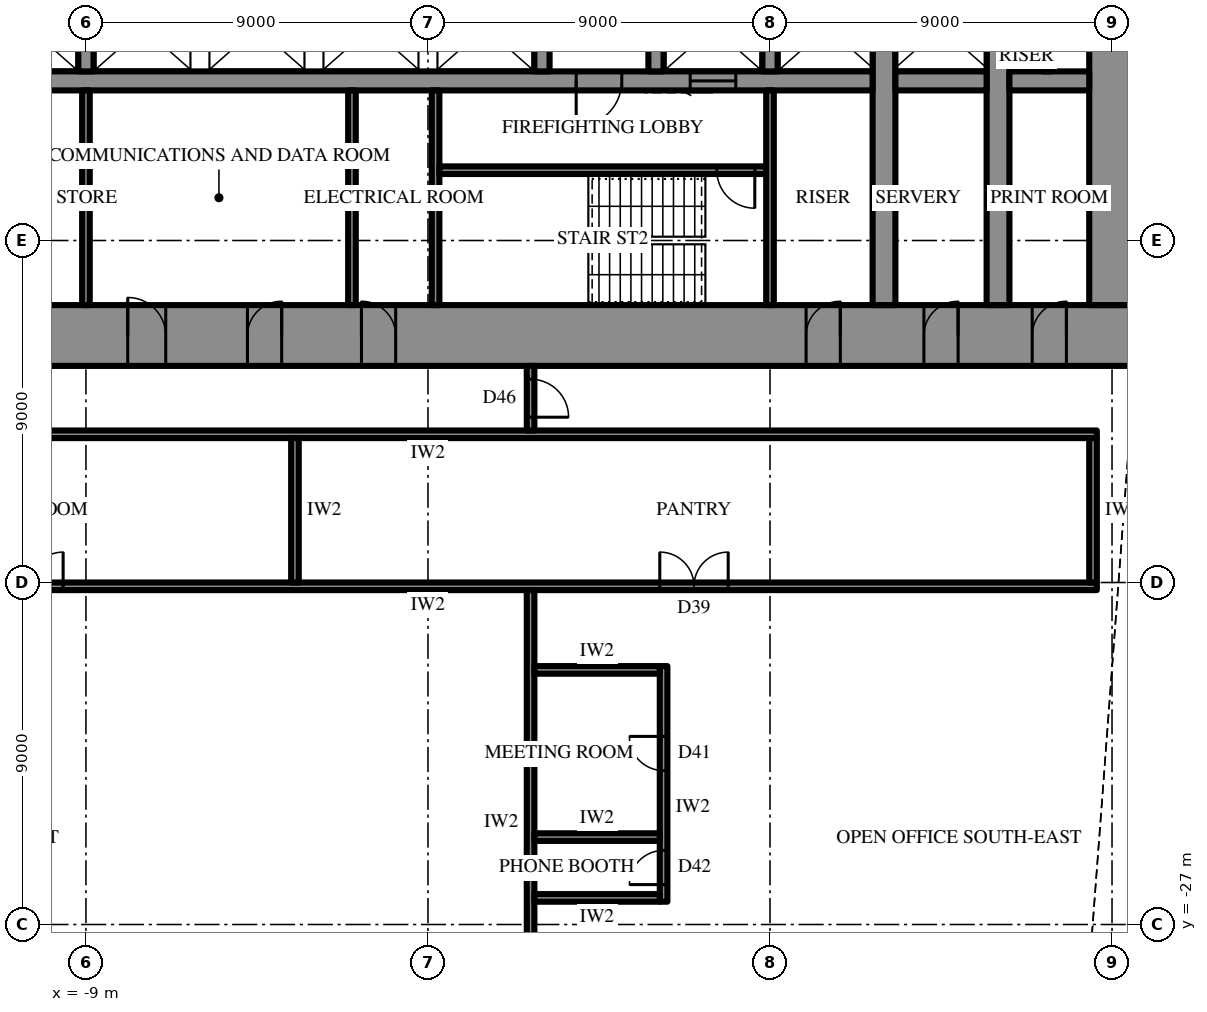
"""IFC4 building model, lengths in metres.
Left out: names, types, materials, properties, quantities, classifications, styles, units other than length and angle.
Written with IfcOpenShell. Run it as: python <this file> out.ifc"""

import sys

from ifc_helpers import new_model, si_unit, direction, frame, frame_2d, origin, place, context, subcontext, project, spatial, rectangle, extrude, element, fill, save


model = new_model("IFC4")
c1 = context("Model", 3, precision=1e-05, world=origin(), true_north=direction((0.0, 1.0)))
c2 = subcontext(c1, "Body", "Model", "MODEL_VIEW")
j1 = project(units=[si_unit("LENGTHUNIT", "METRE"), si_unit("PLANEANGLEUNIT", "RADIAN")], contexts=[c1])
p1 = place(None, origin())
s1 = spatial("IfcSite", under=j1, at=p1, CompositionType="ELEMENT")
p2 = place(p1, origin())
s2 = spatial("IfcBuilding", under=s1, at=p2, CompositionType="ELEMENT")
p3 = place(p2, frame((0.0, 0.0, 153.1)))
s3 = spatial("IfcBuildingStorey", under=s2, at=p3, CompositionType="ELEMENT", Elevation=153.1)
p4 = place(p3, frame((18.6, -11.5, 0.0), z_axis=(0.0, 0.0, 1.0), x_axis=(-1.0, 0.0, 0.0)))
e1 = element("IfcWall", 1, at=p4, inside=s3, PredefinedType="SHEAR", context=c2, shape_type="SweptSolid", body=[
    extrude(rectangle(XDim=37.2, YDim=1.6, at=frame_2d((18.6, 0.0))), origin(), (0.0, 0.0, 1.0), 4.2),
])
p5 = place(p4, frame((19.45, 0.0, 0.0)))
e2 = element("IfcOpeningElement", 2, at=p5, cuts=e1, PredefinedType="OPENING", context=c2, shape_type="SweptSolid", body=[
    extrude(rectangle(XDim=0.9, YDim=2.2, at=frame_2d((0.45, 1.1))), frame((0.0, 0.81, 0.0), z_axis=(0.0, -1.0, 0.0), x_axis=(1.0, 0.0, 0.0)), (0.0, 0.0, 1.0), 1.62),
])
p6 = place(p4, frame((22.45, 0.0, 0.0)))
e3 = element("IfcOpeningElement", 3, at=p6, cuts=e1, PredefinedType="OPENING", context=c2, shape_type="SweptSolid", body=[
    extrude(rectangle(XDim=0.9, YDim=2.2, at=frame_2d((0.45, 1.1))), frame((0.0, 0.81, 0.0), z_axis=(0.0, -1.0, 0.0), x_axis=(1.0, 0.0, 0.0)), (0.0, 0.0, 1.0), 1.62),
])
p7 = place(p4, frame((25.5, 0.0, 0.0)))
e4 = element("IfcOpeningElement", 4, at=p7, cuts=e1, PredefinedType="OPENING", context=c2, shape_type="SweptSolid", body=[
    extrude(rectangle(XDim=1.0, YDim=2.2, at=frame_2d((0.5, 1.1))), frame((0.0, 0.81, 0.0), z_axis=(0.0, -1.0, 0.0), x_axis=(1.0, 0.0, 0.0)), (0.0, 0.0, 1.0), 1.62),
])
p8 = place(p4, frame((1.8, 0.0, 0.0)))
e5 = element("IfcOpeningElement", 5, at=p8, cuts=e1, PredefinedType="OPENING", context=c2, shape_type="SweptSolid", body=[
    extrude(rectangle(XDim=0.9, YDim=2.2, at=frame_2d((0.45, 1.1))), frame((0.0, 0.81, 0.0), z_axis=(0.0, -1.0, 0.0), x_axis=(1.0, 0.0, 0.0)), (0.0, 0.0, 1.0), 1.62),
])
p9 = place(p4, frame((4.65, 0.0, 0.0)))
e6 = element("IfcOpeningElement", 6, at=p9, cuts=e1, PredefinedType="OPENING", context=c2, shape_type="SweptSolid", body=[
    extrude(rectangle(XDim=0.9, YDim=2.2, at=frame_2d((0.45, 1.1))), frame((0.0, 0.81, 0.0), z_axis=(0.0, -1.0, 0.0), x_axis=(1.0, 0.0, 0.0)), (0.0, 0.0, 1.0), 1.62),
])
p10 = place(p4, frame((7.75, 0.0, 0.0)))
e7 = element("IfcOpeningElement", 7, at=p10, cuts=e1, PredefinedType="OPENING", context=c2, shape_type="SweptSolid", body=[
    extrude(rectangle(XDim=0.9, YDim=2.2, at=frame_2d((0.45, 1.1))), frame((0.0, 0.81, 0.0), z_axis=(0.0, -1.0, 0.0), x_axis=(1.0, 0.0, 0.0)), (0.0, 0.0, 1.0), 1.62),
])
p11 = place(p4, frame((28.55, 0.0, 0.0)))
e8 = element("IfcOpeningElement", 8, at=p11, cuts=e1, PredefinedType="OPENING", context=c2, shape_type="SweptSolid", body=[
    extrude(rectangle(XDim=0.9, YDim=2.2, at=frame_2d((0.45, 1.1))), frame((0.0, 0.81, 0.0), z_axis=(0.0, -1.0, 0.0), x_axis=(1.0, 0.0, 0.0)), (0.0, 0.0, 1.0), 1.62),
])
p12 = place(p4, frame((31.65, 0.0, 0.0)))
e9 = element("IfcOpeningElement", 9, at=p12, cuts=e1, PredefinedType="OPENING", context=c2, shape_type="SweptSolid", body=[
    extrude(rectangle(XDim=0.9, YDim=2.2, at=frame_2d((0.45, 1.1))), frame((0.0, 0.81, 0.0), z_axis=(0.0, -1.0, 0.0), x_axis=(1.0, 0.0, 0.0)), (0.0, 0.0, 1.0), 1.62),
])
p13 = place(p4, frame((34.5, 0.0, 0.0)))
e10 = element("IfcOpeningElement", 10, at=p13, cuts=e1, PredefinedType="OPENING", context=c2, shape_type="SweptSolid", body=[
    extrude(rectangle(XDim=0.9, YDim=2.2, at=frame_2d((0.45, 1.1))), frame((0.0, 0.81, 0.0), z_axis=(0.0, -1.0, 0.0), x_axis=(1.0, 0.0, 0.0)), (0.0, 0.0, 1.0), 1.62),
])
p14 = place(p3, frame((18.0, -10.7, 0.0), z_axis=(0.0, 0.0, 1.0), x_axis=(0.0, 1.0, 0.0)))
e11 = element("IfcWall", 11, at=p14, inside=s3, PredefinedType="SHEAR", context=c2, shape_type="SweptSolid", body=[
    extrude(rectangle(XDim=21.4, YDim=1.2, at=frame_2d((10.7, 0.0))), origin(), (0.0, 0.0, 1.0), 4.2),
])
p15 = place(p14, frame((9.8, 0.0, 0.0)))
e12 = element("IfcOpeningElement", 12, at=p15, cuts=e11, PredefinedType="OPENING", context=c2, shape_type="SweptSolid", body=[
    extrude(rectangle(XDim=1.8, YDim=2.4, at=frame_2d((0.9, 1.2))), frame((0.0, 0.61, 0.0), z_axis=(0.0, -1.0, 0.0), x_axis=(1.0, 0.0, 0.0)), (0.0, 0.0, 1.0), 1.22),
])
p16 = place(p3, frame((12.0, -10.7, 0.0), z_axis=(0.0, 0.0, 1.0), x_axis=(0.0, 1.0, 0.0)))
e13 = element("IfcWall", 13, at=p16, inside=s3, PredefinedType="SHEAR", context=c2, shape_type="SweptSolid", body=[
    extrude(rectangle(XDim=21.4, YDim=0.6, at=frame_2d((10.7, 0.0))), origin(), (0.0, 0.0, 1.0), 4.2),
])
p17 = place(p16, frame((9.8, 0.0, 0.0)))
e14 = element("IfcOpeningElement", 14, at=p17, cuts=e13, PredefinedType="OPENING", context=c2, shape_type="SweptSolid", body=[
    extrude(rectangle(XDim=1.8, YDim=2.4, at=frame_2d((0.9, 1.2))), frame((0.0, 0.31, 0.0), z_axis=(0.0, -1.0, 0.0), x_axis=(1.0, 0.0, 0.0)), (0.0, 0.0, 1.0), 0.62),
])
p18 = place(p3, frame((15.0, -10.7, 0.0), z_axis=(0.0, 0.0, 1.0), x_axis=(0.0, 1.0, 0.0)))
e15 = element("IfcWall", 15, at=p18, inside=s3, PredefinedType="SHEAR", context=c2, shape_type="SweptSolid", body=[
    extrude(rectangle(XDim=21.4, YDim=0.6, at=frame_2d((10.7, 0.0))), origin(), (0.0, 0.0, 1.0), 4.2),
])
p19 = place(p18, frame((9.8, 0.0, 0.0)))
e16 = element("IfcOpeningElement", 16, at=p19, cuts=e15, PredefinedType="OPENING", context=c2, shape_type="SweptSolid", body=[
    extrude(rectangle(XDim=1.8, YDim=2.4, at=frame_2d((0.9, 1.2))), frame((0.0, 0.31, 0.0), z_axis=(0.0, -1.0, 0.0), x_axis=(1.0, 0.0, 0.0)), (0.0, 0.0, 1.0), 0.62),
])
p20 = place(p3, frame((17.4, -4.8, 0.0), z_axis=(0.0, 0.0, 1.0), x_axis=(-1.0, 0.0, 0.0)))
e17 = element("IfcWall", 17, at=p20, inside=s3, PredefinedType="SHEAR", context=c2, shape_type="SweptSolid", body=[
    extrude(rectangle(XDim=2.1, YDim=0.5, at=frame_2d((1.05, 0.0))), origin(), (0.0, 0.0, 1.0), 4.2),
])
p21 = place(p3, frame((14.7, -4.8, 0.0), z_axis=(0.0, 0.0, 1.0), x_axis=(-1.0, 0.0, 0.0)))
e18 = element("IfcWall", 18, at=p21, inside=s3, PredefinedType="SHEAR", context=c2, shape_type="SweptSolid", body=[
    extrude(rectangle(XDim=2.4, YDim=0.5, at=frame_2d((1.2, 0.0))), origin(), (0.0, 0.0, 1.0), 4.2),
])
p22 = place(p3, frame((11.7, -4.8, 0.0), z_axis=(0.0, 0.0, 1.0), x_axis=(-1.0, 0.0, 0.0)))
e19 = element("IfcWall", 19, at=p22, inside=s3, PredefinedType="SHEAR", context=c2, shape_type="SweptSolid", body=[
    extrude(rectangle(XDim=23.4, YDim=0.5, at=frame_2d((11.7, 0.0))), origin(), (0.0, 0.0, 1.0), 4.2),
])
p23 = place(p22, frame((6.6, 0.0, 0.0)))
e20 = element("IfcOpeningElement", 20, at=p23, cuts=e19, PredefinedType="OPENING", context=c2, shape_type="SweptSolid", body=[
    extrude(rectangle(XDim=1.2, YDim=2.2, at=frame_2d((0.6, 1.1))), frame((0.0, 0.26, 0.0), z_axis=(0.0, -1.0, 0.0), x_axis=(1.0, 0.0, 0.0)), (0.0, 0.0, 1.0), 0.52),
])
p24 = place(p22, frame((3.6, 0.0, 0.0)))
e21 = element("IfcOpeningElement", 21, at=p24, cuts=e19, PredefinedType="OPENING", context=c2, shape_type="SweptSolid", body=[
    extrude(rectangle(XDim=1.2, YDim=2.2, at=frame_2d((0.6, 1.1))), frame((0.0, 0.26, 0.0), z_axis=(0.0, -1.0, 0.0), x_axis=(1.0, 0.0, 0.0)), (0.0, 0.0, 1.0), 0.52),
])
for number, where, z_axis, x_axis in (
    (22, (9.0, -2.25, 0.0), (0.0, 0.0, 1.0), (0.0, -1.0, 0.0)),
    (23, (6.0, -2.25, 0.0), (0.0, 0.0, 1.0), (0.0, -1.0, 0.0)),
    (24, (3.0, -2.25, 0.0), (0.0, 0.0, 1.0), (0.0, -1.0, 0.0)),
    (25, (-9.0, -2.25, 0.0), (0.0, 0.0, 1.0), (0.0, -1.0, 0.0)),
):
    element("IfcWall", number, at=place(p3, frame(where, z_axis=z_axis, x_axis=x_axis)), inside=s3, PredefinedType="SHEAR", context=c2, shape_type="SweptSolid", body=[
        extrude(rectangle(XDim=2.3, YDim=0.4, at=frame_2d((1.15, 0.0))), origin(), (0.0, 0.0, 1.0), 4.2),
    ])
p25 = place(p3, frame((0.2, -5.05, 0.0), z_axis=(0.0, 0.0, 1.0), x_axis=(0.0, -1.0, 0.0)))
e26 = element("IfcWall", 26, at=p25, inside=s3, PredefinedType="SHEAR", context=c2, shape_type="SweptSolid", body=[
    extrude(rectangle(XDim=5.65, YDim=0.2, at=frame_2d((2.825, 0.0))), origin(), (0.0, 0.0, 1.0), 4.2),
])
p26 = place(p3, frame((8.9, -7.15, 0.0), z_axis=(0.0, 0.0, 1.0), x_axis=(-1.0, 0.0, 0.0)))
e27 = element("IfcWall", 27, at=p26, inside=s3, PredefinedType="SHEAR", context=c2, shape_type="SweptSolid", body=[
    extrude(rectangle(XDim=8.6, YDim=0.2, at=frame_2d((4.3, 0.0))), origin(), (0.0, 0.0, 1.0), 4.2),
])
p27 = place(p26, frame((0.3, 0.0, 0.0)))
e28 = element("IfcOpeningElement", 28, at=p27, cuts=e27, PredefinedType="OPENING", context=c2, shape_type="SweptSolid", body=[
    extrude(rectangle(XDim=1.0, YDim=2.2, at=frame_2d((0.5, 1.1))), frame((0.0, 0.11, 0.0), z_axis=(0.0, -1.0, 0.0), x_axis=(1.0, 0.0, 0.0)), (0.0, 0.0, 1.0), 0.22),
])
for number, where, z_axis, x_axis in (
    (29, (9.0, -5.05, 0.0), (0.0, 0.0, 1.0), (0.0, -1.0, 0.0)),
    (30, (-9.0, -5.05, 0.0), (0.0, 0.0, 1.0), (0.0, -1.0, 0.0)),
    (31, (-2.0, -5.05, 0.0), (0.0, 0.0, 1.0), (0.0, -1.0, 0.0)),
):
    element("IfcWall", number, at=place(p3, frame(where, z_axis=z_axis, x_axis=x_axis)), inside=s3, PredefinedType="PARTITIONING", context=c2, shape_type="SweptSolid", body=[
        extrude(rectangle(XDim=5.65, YDim=0.2, at=frame_2d((2.825, 0.0))), origin(), (0.0, 0.0, 1.0), 4.0),
    ])
p28 = place(p3, frame((16.3, -3.55, 0.0), z_axis=(0.0, 0.0, 1.0), x_axis=(0.0, -1.0, 0.0)))
e32 = element("IfcWall", 32, at=p28, inside=s3, PredefinedType="PARTITIONING", context=c2, shape_type="SweptSolid", body=[
    extrude(rectangle(XDim=1.0, YDim=0.2, at=frame_2d((0.5, 0.0))), origin(), (0.0, 0.0, 1.0), 4.0),
])
p29 = place(p3, frame((17.6, -14.1, 0.0), z_axis=(0.0, 0.0, 1.0), x_axis=(-1.0, 0.0, 0.0)))
e33 = element("IfcWall", 33, at=p29, inside=s3, PredefinedType="PARTITIONING", context=c2, shape_type="SweptSolid", body=[
    extrude(rectangle(XDim=35.2, YDim=0.2, at=frame_2d((17.6, 0.0))), origin(), (0.0, 0.0, 1.0), 4.0),
])
p30 = place(p3, frame((17.6, -18.1, 0.0), z_axis=(0.0, 0.0, 1.0), x_axis=(-1.0, 0.0, 0.0)))
e34 = element("IfcWall", 34, at=p30, inside=s3, PredefinedType="PARTITIONING", context=c2, shape_type="SweptSolid", body=[
    extrude(rectangle(XDim=35.2, YDim=0.2, at=frame_2d((17.6, 0.0))), origin(), (0.0, 0.0, 1.0), 4.0),
])
p31 = place(p30, frame((9.7, 0.0, 0.0)))
e35 = element("IfcOpeningElement", 35, at=p31, cuts=e34, PredefinedType="OPENING", context=c2, shape_type="SweptSolid", body=[
    extrude(rectangle(XDim=1.8, YDim=2.4, at=frame_2d((0.9, 1.2))), frame((0.0, 0.11, 0.0), z_axis=(0.0, -1.0, 0.0), x_axis=(1.0, 0.0, 0.0)), (0.0, 0.0, 1.0), 0.22),
])
p32 = place(p30, frame((27.2, 0.0, 0.0)))
e36 = element("IfcOpeningElement", 36, at=p32, cuts=e34, PredefinedType="OPENING", context=c2, shape_type="SweptSolid", body=[
    extrude(rectangle(XDim=1.8, YDim=2.4, at=frame_2d((0.9, 1.2))), frame((0.0, 0.11, 0.0), z_axis=(0.0, -1.0, 0.0), x_axis=(1.0, 0.0, 0.0)), (0.0, 0.0, 1.0), 0.22),
])
for number, where, z_axis, x_axis in (
    (37, (17.5, -14.2, 0.0), (0.0, 0.0, 1.0), (0.0, -1.0, 0.0)),
    (38, (-3.5, -14.2, 0.0), (0.0, 0.0, 1.0), (0.0, -1.0, 0.0)),
):
    element("IfcWall", number, at=place(p3, frame(where, z_axis=z_axis, x_axis=x_axis)), inside=s3, PredefinedType="PARTITIONING", context=c2, shape_type="SweptSolid", body=[
        extrude(rectangle(XDim=3.8, YDim=0.2, at=frame_2d((1.9, 0.0))), origin(), (0.0, 0.0, 1.0), 4.0),
    ])
p33 = place(p3, frame((2.7, -12.3, 0.0), z_axis=(0.0, 0.0, 1.0), x_axis=(0.0, -1.0, 0.0)))
e39 = element("IfcWall", 39, at=p33, inside=s3, PredefinedType="PARTITIONING", context=c2, shape_type="SweptSolid", body=[
    extrude(rectangle(XDim=1.7, YDim=0.2, at=frame_2d((0.85, 0.0))), origin(), (0.0, 0.0, 1.0), 4.0),
])
p34 = place(p33, frame((0.35, 0.0, 0.0)))
e40 = element("IfcOpeningElement", 40, at=p34, cuts=e39, PredefinedType="OPENING", context=c2, shape_type="SweptSolid", body=[
    extrude(rectangle(XDim=1.0, YDim=2.2, at=frame_2d((0.5, 1.1))), frame((0.0, 0.11, 0.0), z_axis=(0.0, -1.0, 0.0), x_axis=(1.0, 0.0, 0.0)), (0.0, 0.0, 1.0), 0.22),
])
p35 = place(p3, frame((2.7, -18.2, 0.0), z_axis=(0.0, 0.0, 1.0), x_axis=(0.0, -1.0, 0.0)))
e41 = element("IfcWall", 41, at=p35, inside=s3, PredefinedType="PARTITIONING", context=c2, shape_type="SweptSolid", body=[
    extrude(rectangle(XDim=10.2, YDim=0.2, at=frame_2d((5.1, 0.0))), origin(), (0.0, 0.0, 1.0), 4.0),
])
p36 = place(p3, frame((6.2, -20.2, 0.0), z_axis=(0.0, 0.0, 1.0), x_axis=(0.0, -1.0, 0.0)))
e42 = element("IfcWall", 42, at=p36, inside=s3, PredefinedType="PARTITIONING", context=c2, shape_type="SweptSolid", body=[
    extrude(rectangle(XDim=6.2, YDim=0.2, at=frame_2d((3.1, 0.0))), origin(), (0.0, 0.0, 1.0), 4.0),
])
p37 = place(p36, frame((1.85, 0.0, 0.0)))
e43 = element("IfcOpeningElement", 43, at=p37, cuts=e42, PredefinedType="OPENING", context=c2, shape_type="SweptSolid", body=[
    extrude(rectangle(XDim=0.9, YDim=2.2, at=frame_2d((0.45, 1.1))), frame((0.0, 0.11, 0.0), z_axis=(0.0, -1.0, 0.0), x_axis=(1.0, 0.0, 0.0)), (0.0, 0.0, 1.0), 0.22),
])
p38 = place(p36, frame((4.85, 0.0, 0.0)))
e44 = element("IfcOpeningElement", 44, at=p38, cuts=e42, PredefinedType="OPENING", context=c2, shape_type="SweptSolid", body=[
    extrude(rectangle(XDim=0.9, YDim=2.2, at=frame_2d((0.45, 1.1))), frame((0.0, 0.11, 0.0), z_axis=(0.0, -1.0, 0.0), x_axis=(1.0, 0.0, 0.0)), (0.0, 0.0, 1.0), 0.22),
])
for number, where, z_axis, x_axis in (
    (45, (2.8, -20.3, 0.0), (0.0, 0.0, 1.0), (1.0, 0.0, 0.0)),
    (46, (2.8, -24.7, 0.0), (0.0, 0.0, 1.0), (1.0, 0.0, 0.0)),
    (47, (2.8, -26.3, 0.0), (0.0, 0.0, 1.0), (1.0, 0.0, 0.0)),
):
    element("IfcWall", number, at=place(p3, frame(where, z_axis=z_axis, x_axis=x_axis)), inside=s3, PredefinedType="PARTITIONING", context=c2, shape_type="SweptSolid", body=[
        extrude(rectangle(XDim=3.3, YDim=0.2, at=frame_2d((1.65, 0.0))), origin(), (0.0, 0.0, 1.0), 4.0),
    ])
p39 = place(p23, origin())
e48 = element("IfcDoor", 48, at=p39, inside=s3, OperationType="SINGLE_SWING_LEFT", PredefinedType="DOOR", context=c2, shape_type="SweptSolid", body=[
    extrude(rectangle(XDim=1.2, YDim=2.2, at=frame_2d((0.6, 1.1))), frame((0.0, 0.025, 0.0), z_axis=(0.0, -1.0, 0.0), x_axis=(1.0, 0.0, 0.0)), (0.0, 0.0, 1.0), 0.05),
])
fill(e20, e48)
p40 = place(p27, origin())
e49 = element("IfcDoor", 49, at=p40, inside=s3, OperationType="SINGLE_SWING_RIGHT", PredefinedType="DOOR", context=c2, shape_type="SweptSolid", body=[
    extrude(rectangle(XDim=1.0, YDim=2.2, at=frame_2d((0.5, 1.1))), frame((0.0, 0.025, 0.0), z_axis=(0.0, -1.0, 0.0), x_axis=(1.0, 0.0, 0.0)), (0.0, 0.0, 1.0), 0.05),
])
fill(e28, e49)
p41 = place(p5, frame((0.9, 0.0, 0.0), z_axis=(0.0, 0.0, 1.0), x_axis=(-1.0, 0.0, 0.0)))
e50 = element("IfcDoor", 50, at=p41, inside=s3, OperationType="SINGLE_SWING_RIGHT", PredefinedType="DOOR", context=c2, shape_type="SweptSolid", body=[
    extrude(rectangle(XDim=0.9, YDim=2.2, at=frame_2d((0.45, 1.1))), frame((0.0, 0.025, 0.0), z_axis=(0.0, -1.0, 0.0), x_axis=(1.0, 0.0, 0.0)), (0.0, 0.0, 1.0), 0.05),
])
fill(e2, e50)
p42 = place(p6, frame((0.9, 0.0, 0.0), z_axis=(0.0, 0.0, 1.0), x_axis=(-1.0, 0.0, 0.0)))
e51 = element("IfcDoor", 51, at=p42, inside=s3, OperationType="SINGLE_SWING_LEFT", PredefinedType="DOOR", context=c2, shape_type="SweptSolid", body=[
    extrude(rectangle(XDim=0.9, YDim=2.2, at=frame_2d((0.45, 1.1))), frame((0.0, 0.025, 0.0), z_axis=(0.0, -1.0, 0.0), x_axis=(1.0, 0.0, 0.0)), (0.0, 0.0, 1.0), 0.05),
])
fill(e3, e51)
p43 = place(p7, frame((1.0, 0.0, 0.0), z_axis=(0.0, 0.0, 1.0), x_axis=(-1.0, 0.0, 0.0)))
e52 = element("IfcDoor", 52, at=p43, inside=s3, OperationType="SINGLE_SWING_RIGHT", PredefinedType="DOOR", context=c2, shape_type="SweptSolid", body=[
    extrude(rectangle(XDim=1.0, YDim=2.2, at=frame_2d((0.5, 1.1))), frame((0.0, 0.025, 0.0), z_axis=(0.0, -1.0, 0.0), x_axis=(1.0, 0.0, 0.0)), (0.0, 0.0, 1.0), 0.05),
])
fill(e4, e52)
p44 = place(p8, frame((0.9, 0.0, 0.0), z_axis=(0.0, 0.0, 1.0), x_axis=(-1.0, 0.0, 0.0)))
e53 = element("IfcDoor", 53, at=p44, inside=s3, OperationType="SINGLE_SWING_LEFT", PredefinedType="DOOR", context=c2, shape_type="SweptSolid", body=[
    extrude(rectangle(XDim=0.9, YDim=2.2, at=frame_2d((0.45, 1.1))), frame((0.0, 0.025, 0.0), z_axis=(0.0, -1.0, 0.0), x_axis=(1.0, 0.0, 0.0)), (0.0, 0.0, 1.0), 0.05),
])
fill(e5, e53)
p45 = place(p9, frame((0.9, 0.0, 0.0), z_axis=(0.0, 0.0, 1.0), x_axis=(-1.0, 0.0, 0.0)))
e54 = element("IfcDoor", 54, at=p45, inside=s3, OperationType="SINGLE_SWING_LEFT", PredefinedType="DOOR", context=c2, shape_type="SweptSolid", body=[
    extrude(rectangle(XDim=0.9, YDim=2.2, at=frame_2d((0.45, 1.1))), frame((0.0, 0.025, 0.0), z_axis=(0.0, -1.0, 0.0), x_axis=(1.0, 0.0, 0.0)), (0.0, 0.0, 1.0), 0.05),
])
fill(e6, e54)
p46 = place(p10, frame((0.9, 0.0, 0.0), z_axis=(0.0, 0.0, 1.0), x_axis=(-1.0, 0.0, 0.0)))
e55 = element("IfcDoor", 55, at=p46, inside=s3, OperationType="SINGLE_SWING_LEFT", PredefinedType="DOOR", context=c2, shape_type="SweptSolid", body=[
    extrude(rectangle(XDim=0.9, YDim=2.2, at=frame_2d((0.45, 1.1))), frame((0.0, 0.025, 0.0), z_axis=(0.0, -1.0, 0.0), x_axis=(1.0, 0.0, 0.0)), (0.0, 0.0, 1.0), 0.05),
])
fill(e7, e55)
p47 = place(p24, origin())
e56 = element("IfcDoor", 56, at=p47, inside=s3, OperationType="SLIDING_TO_LEFT", PredefinedType="DOOR", context=c2, shape_type="SweptSolid", body=[
    extrude(rectangle(XDim=1.2, YDim=2.2, at=frame_2d((0.6, 1.1))), frame((0.0, 0.025, 0.0), z_axis=(0.0, -1.0, 0.0), x_axis=(1.0, 0.0, 0.0)), (0.0, 0.0, 1.0), 0.05),
])
fill(e21, e56)
p48 = place(p31, frame((1.8, 0.0, 0.0), z_axis=(0.0, 0.0, 1.0), x_axis=(-1.0, 0.0, 0.0)))
e57 = element("IfcDoor", 57, at=p48, inside=s3, OperationType="DOUBLE_DOOR_SINGLE_SWING", PredefinedType="DOOR", context=c2, shape_type="SweptSolid", body=[
    extrude(rectangle(XDim=1.8, YDim=2.4, at=frame_2d((0.9, 1.2))), frame((0.0, 0.025, 0.0), z_axis=(0.0, -1.0, 0.0), x_axis=(1.0, 0.0, 0.0)), (0.0, 0.0, 1.0), 0.05),
])
fill(e35, e57)
p49 = place(p32, frame((1.8, 0.0, 0.0), z_axis=(0.0, 0.0, 1.0), x_axis=(-1.0, 0.0, 0.0)))
e58 = element("IfcDoor", 58, at=p49, inside=s3, OperationType="DOUBLE_DOOR_SINGLE_SWING", PredefinedType="DOOR", context=c2, shape_type="SweptSolid", body=[
    extrude(rectangle(XDim=1.8, YDim=2.4, at=frame_2d((0.9, 1.2))), frame((0.0, 0.025, 0.0), z_axis=(0.0, -1.0, 0.0), x_axis=(1.0, 0.0, 0.0)), (0.0, 0.0, 1.0), 0.05),
])
fill(e36, e58)
p50 = place(p34, origin())
e59 = element("IfcDoor", 59, at=p50, inside=s3, OperationType="SINGLE_SWING_LEFT", PredefinedType="DOOR", context=c2, shape_type="SweptSolid", body=[
    extrude(rectangle(XDim=1.0, YDim=2.2, at=frame_2d((0.5, 1.1))), frame((0.0, 0.025, 0.0), z_axis=(0.0, -1.0, 0.0), x_axis=(1.0, 0.0, 0.0)), (0.0, 0.0, 1.0), 0.05),
])
fill(e40, e59)
p51 = place(p37, frame((0.9, 0.0, 0.0), z_axis=(0.0, 0.0, 1.0), x_axis=(-1.0, 0.0, 0.0)))
e60 = element("IfcDoor", 60, at=p51, inside=s3, OperationType="SINGLE_SWING_LEFT", PredefinedType="DOOR", context=c2, shape_type="SweptSolid", body=[
    extrude(rectangle(XDim=0.9, YDim=2.2, at=frame_2d((0.45, 1.1))), frame((0.0, 0.025, 0.0), z_axis=(0.0, -1.0, 0.0), x_axis=(1.0, 0.0, 0.0)), (0.0, 0.0, 1.0), 0.05),
])
fill(e43, e60)
p52 = place(p38, frame((0.9, 0.0, 0.0), z_axis=(0.0, 0.0, 1.0), x_axis=(-1.0, 0.0, 0.0)))
e61 = element("IfcDoor", 61, at=p52, inside=s3, OperationType="SINGLE_SWING_RIGHT", PredefinedType="DOOR", context=c2, shape_type="SweptSolid", body=[
    extrude(rectangle(XDim=0.9, YDim=2.2, at=frame_2d((0.45, 1.1))), frame((0.0, 0.025, 0.0), z_axis=(0.0, -1.0, 0.0), x_axis=(1.0, 0.0, 0.0)), (0.0, 0.0, 1.0), 0.05),
])
fill(e44, e61)
save(model, sys.argv[1])
